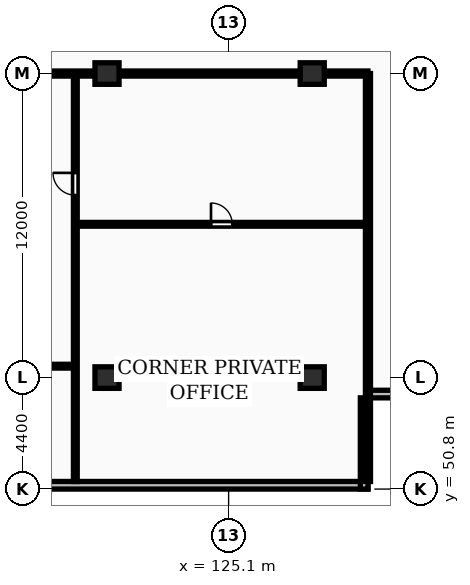
"""IFC4 building model, lengths in metres.
Left out: names, types, materials, properties, quantities, classifications, styles, units other than length and angle.
Written with IfcOpenShell. Run it as: python <this file> out.ifc"""

import sys

from ifc_helpers import new_model, si_unit, direction, frame, frame_2d, origin, origin_2d, place, context, subcontext, project, spatial, rectangle, extrude, element, fill, save


model = new_model("IFC4")
c1 = context("Model", 3, precision=1e-05, world=origin(), true_north=direction((0.0, 1.0)))
c2 = subcontext(c1, "Body", "Model", "MODEL_VIEW")
j1 = project(units=[si_unit("LENGTHUNIT", "METRE"), si_unit("PLANEANGLEUNIT", "RADIAN")], contexts=[c1])
p1 = place(None, origin())
s1 = spatial("IfcSite", under=j1, at=p1, CompositionType="ELEMENT")
p2 = place(p1, origin())
s2 = spatial("IfcBuilding", under=s1, at=p2, CompositionType="ELEMENT")
p3 = place(p2, frame((0.0, 0.0, 80.8)))
s3 = spatial("IfcBuildingStorey", under=s2, at=p3, CompositionType="ELEMENT", Elevation=80.8)
for number, where, z_axis, x_axis in (
    (1, (120.3, 55.2, 0.0), (0.0, 0.0, 1.0), (1.0, 0.0, 0.0)),
    (2, (120.3, 67.2, 0.0), (0.0, 0.0, 1.0), (1.0, 0.0, 0.0)),
    (3, (128.4, 55.2, 0.0), (0.0, 0.0, 1.0), (1.0, 0.0, 0.0)),
    (4, (128.4, 67.2, 0.0), (0.0, 0.0, 1.0), (1.0, 0.0, 0.0)),
):
    element("IfcColumn", number, at=place(p3, frame(where, z_axis=z_axis, x_axis=x_axis)), inside=s3, PredefinedType="COLUMN", context=c2, shape_type="SweptSolid", body=[
        extrude(rectangle(XDim=0.95, YDim=0.85, at=origin_2d()), origin(), (0.0, 0.0, 1.0), 3.25),
    ])
p4 = place(p3, frame((57.6, 50.95, 0.0), z_axis=(0.0, 0.0, 1.0), x_axis=(1.0, 0.0, 0.0)))
e5 = element("IfcWall", 5, at=p4, inside=s3, PredefinedType="STANDARD", context=c2, shape_type="SweptSolid", body=[
    extrude(rectangle(XDim=73.0, YDim=0.3, at=frame_2d((36.5, 0.0))), origin(), (0.0, 0.0, 1.0), 2.97),
])
p5 = place(p4, frame((15.225, 0.0, 0.85)))
e6 = element("IfcOpeningElement", 6, at=p5, cuts=e5, PredefinedType="OPENING", context=c2, shape_type="SweptSolid", body=[
    extrude(rectangle(XDim=1.8, YDim=1.8, at=frame_2d((0.9, 0.9))), frame((0.0, 0.16, 0.0), z_axis=(0.0, -1.0, 0.0), x_axis=(1.0, 0.0, 0.0)), (0.0, 0.0, 1.0), 0.32),
])
p6 = place(p4, frame((58.575, 0.0, 0.85)))
e7 = element("IfcOpeningElement", 7, at=p6, cuts=e5, PredefinedType="OPENING", context=c2, shape_type="SweptSolid", body=[
    extrude(rectangle(XDim=1.8, YDim=1.8, at=frame_2d((0.9, 0.9))), frame((0.0, 0.16, 0.0), z_axis=(0.0, -1.0, 0.0), x_axis=(1.0, 0.0, 0.0)), (0.0, 0.0, 1.0), 0.32),
])
for number, where, z_axis, x_axis in (
    (8, (130.45, 50.8, 0.0), (0.0, 0.0, 1.0), (0.0, 1.0, 0.0)),
    (9, (130.6, 54.55, 0.0), (0.0, 0.0, 1.0), (1.0, 0.0, 0.0)),
):
    element("IfcWall", number, at=place(p3, frame(where, z_axis=z_axis, x_axis=x_axis)), inside=s3, PredefinedType="STANDARD", context=c2, shape_type="SweptSolid", body=[
        extrude(rectangle(XDim=3.6, YDim=0.3, at=frame_2d((1.8, 0.0))), origin(), (0.0, 0.0, 1.0), 2.97),
    ])
p7 = place(p3, frame((130.6, 51.1, 0.0), z_axis=(0.0, 0.0, 1.0), x_axis=(0.0, 1.0, 0.0)))
e10 = element("IfcWall", 10, at=p7, inside=s3, PredefinedType="PARTITIONING", context=c2, shape_type="SweptSolid", body=[
    extrude(rectangle(XDim=16.1, YDim=0.2, at=frame_2d((8.05, 0.0))), origin(), (0.0, 0.0, 1.0), 2.97),
])
p8 = place(p3, frame((119.05, 61.25, 0.0), z_axis=(0.0, 0.0, 1.0), x_axis=(1.0, 0.0, 0.0)))
e11 = element("IfcWall", 11, at=p8, inside=s3, PredefinedType="PARTITIONING", context=c2, shape_type="SweptSolid", body=[
    extrude(rectangle(XDim=11.55, YDim=0.15, at=frame_2d((5.775, 0.0))), origin(), (0.0, 0.0, 1.0), 2.97),
])
p9 = place(p8, frame((5.355, 0.0, 0.0)))
e12 = element("IfcOpeningElement", 12, at=p9, cuts=e11, PredefinedType="OPENING", context=c2, shape_type="SweptSolid", body=[
    extrude(rectangle(XDim=0.84, YDim=2.04, at=frame_2d((0.42, 1.02))), frame((0.0, 0.085, 0.0), z_axis=(0.0, -1.0, 0.0), x_axis=(1.0, 0.0, 0.0)), (0.0, 0.0, 1.0), 0.17),
])
p10 = place(p3, frame((119.05, 51.1, 0.0), z_axis=(0.0, 0.0, 1.0), x_axis=(0.0, 1.0, 0.0)))
e13 = element("IfcWall", 13, at=p10, inside=s3, PredefinedType="PARTITIONING", context=c2, shape_type="SweptSolid", body=[
    extrude(rectangle(XDim=16.05, YDim=0.15, at=frame_2d((8.025, 0.0))), origin(), (0.0, 0.0, 1.0), 2.97),
])
p11 = place(p10, frame((11.3, 0.0, 0.0)))
e14 = element("IfcOpeningElement", 14, at=p11, cuts=e13, PredefinedType="OPENING", context=c2, shape_type="SweptSolid", body=[
    extrude(rectangle(XDim=0.88, YDim=2.06, at=frame_2d((0.44, 1.03))), frame((0.0, 0.085, 0.0), z_axis=(0.0, -1.0, 0.0), x_axis=(1.0, 0.0, 0.0)), (0.0, 0.0, 1.0), 0.17),
])
p12 = place(p3, frame((112.27, 55.65, 0.0), z_axis=(0.0, 0.0, 1.0), x_axis=(1.0, 0.0, 0.0)))
e15 = element("IfcWall", 15, at=p12, inside=s3, PredefinedType="PARTITIONING", context=c2, shape_type="SweptSolid", body=[
    extrude(rectangle(XDim=6.76, YDim=0.15, at=frame_2d((3.38, 0.0))), origin(), (0.0, 0.0, 1.0), 2.97),
])
p13 = place(p12, frame((1.64, 0.0, 0.0)))
e16 = element("IfcOpeningElement", 16, at=p13, cuts=e15, PredefinedType="OPENING", context=c2, shape_type="SweptSolid", body=[
    extrude(rectangle(XDim=0.84, YDim=2.04, at=frame_2d((0.42, 1.02))), frame((0.0, 0.085, 0.0), z_axis=(0.0, -1.0, 0.0), x_axis=(1.0, 0.0, 0.0)), (0.0, 0.0, 1.0), 0.17),
])
p14 = place(p12, frame((3.16, 0.0, 0.0)))
e17 = element("IfcOpeningElement", 17, at=p14, cuts=e15, PredefinedType="OPENING", context=c2, shape_type="SweptSolid", body=[
    extrude(rectangle(XDim=0.88, YDim=2.06, at=frame_2d((0.44, 1.03))), frame((0.0, 0.085, 0.0), z_axis=(0.0, -1.0, 0.0), x_axis=(1.0, 0.0, 0.0)), (0.0, 0.0, 1.0), 0.17),
])
p15 = place(p3, frame((112.25, 67.2, 0.0), z_axis=(0.0, 0.0, 1.0), x_axis=(1.0, 0.0, 0.0)))
e18 = element("IfcWall", 18, at=p15, inside=s3, PredefinedType="PARTITIONING", context=c2, shape_type="SweptSolid", body=[
    extrude(rectangle(XDim=18.35, YDim=0.2, at=frame_2d((9.175, 0.0))), origin(), (0.0, 0.0, 1.0), 2.433),
])
p16 = place(p15, frame((1.58, 0.0, 0.0)))
e19 = element("IfcOpeningElement", 19, at=p16, cuts=e18, PredefinedType="OPENING", context=c2, shape_type="SweptSolid", body=[
    extrude(rectangle(XDim=0.95, YDim=2.15, at=frame_2d((0.475, 1.075))), frame((0.0, 0.11, 0.0), z_axis=(0.0, -1.0, 0.0), x_axis=(1.0, 0.0, 0.0)), (0.0, 0.0, 1.0), 0.22),
])
p17 = place(p9, origin())
e20 = element("IfcDoor", 20, at=p17, inside=s3, OperationType="SINGLE_SWING_LEFT", PredefinedType="DOOR", context=c2, shape_type="SweptSolid", body=[
    extrude(rectangle(XDim=0.84, YDim=2.04, at=frame_2d((0.42, 1.02))), frame((0.0, 0.025, 0.0), z_axis=(0.0, -1.0, 0.0), x_axis=(1.0, 0.0, 0.0)), (0.0, 0.0, 1.0), 0.05),
])
fill(e12, e20)
p18 = place(p11, origin())
e21 = element("IfcDoor", 21, at=p18, inside=s3, OperationType="SINGLE_SWING_RIGHT", PredefinedType="DOOR", context=c2, shape_type="SweptSolid", body=[
    extrude(rectangle(XDim=0.88, YDim=2.06, at=frame_2d((0.44, 1.03))), frame((0.0, 0.025, 0.0), z_axis=(0.0, -1.0, 0.0), x_axis=(1.0, 0.0, 0.0)), (0.0, 0.0, 1.0), 0.05),
])
fill(e14, e21)
save(model, sys.argv[1])
